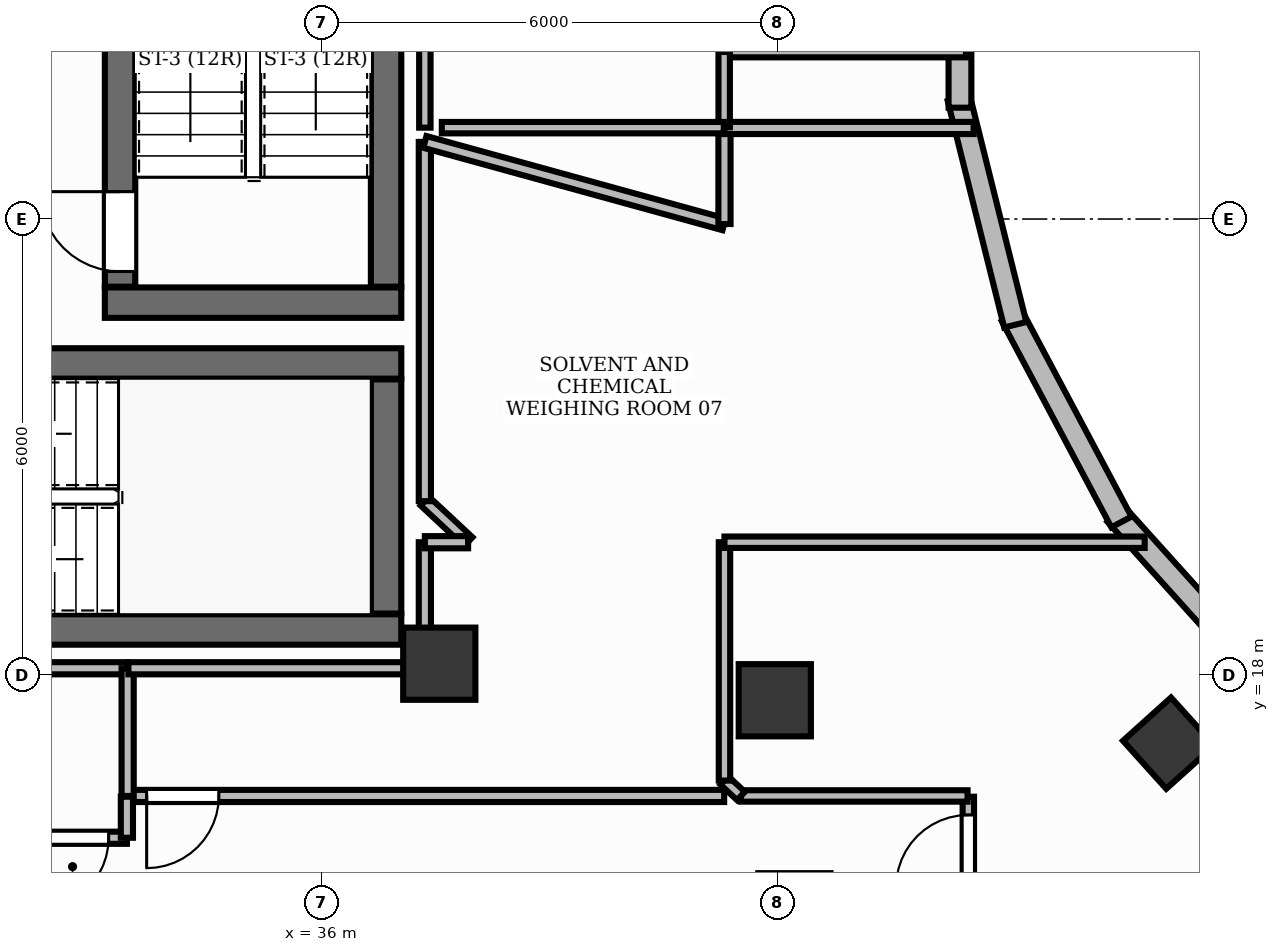
"""IFC4 building model, lengths in metres.
Left out: names, types, materials, properties, quantities, classifications, styles, units other than length and angle.
Written with IfcOpenShell. Run it as: python <this file> out.ifc"""

import sys

from ifc_helpers import new_model, si_unit, direction, frame, frame_2d, origin, origin_2d, place, context, subcontext, project, spatial, rectangle, extrude, element, fill, save


model = new_model("IFC4")
c1 = context("Model", 3, precision=1e-05, world=origin(), true_north=direction((0.0, 1.0)))
c2 = subcontext(c1, "Body", "Model", "MODEL_VIEW")
j1 = project(units=[si_unit("LENGTHUNIT", "METRE"), si_unit("PLANEANGLEUNIT", "RADIAN")], contexts=[c1])
p1 = place(None, origin())
s1 = spatial("IfcSite", under=j1, at=p1, CompositionType="ELEMENT")
p2 = place(p1, origin())
s2 = spatial("IfcBuilding", under=s1, at=p2, CompositionType="ELEMENT")
p3 = place(p2, frame((0.0, 0.0, 264.6)))
s3 = spatial("IfcBuildingStorey", under=s2, at=p3, CompositionType="ELEMENT", Elevation=264.6)
p4 = place(p3, frame((28.852, 18.6, 0.0), z_axis=(0.0, 0.0, 1.0), x_axis=(1.0, 0.0, 0.0)))
e1 = element("IfcWall", 1, at=p4, inside=s3, PredefinedType="SHEAR", context=c2, shape_type="SweptSolid", body=[
    extrude(rectangle(XDim=8.198, YDim=0.4, at=frame_2d((4.099, 0.0))), origin(), (0.0, 0.0, 1.0), 3.9),
])
p5 = place(p3, frame((28.4, 22.1, 0.0), z_axis=(0.0, 0.0, 1.0), x_axis=(1.0, 0.0, 0.0)))
e2 = element("IfcWall", 2, at=p5, inside=s3, PredefinedType="SHEAR", context=c2, shape_type="SweptSolid", body=[
    extrude(rectangle(XDim=8.65, YDim=0.4, at=frame_2d((4.325, 0.0))), origin(), (0.0, 0.0, 1.0), 3.9),
])
p6 = place(p3, frame((36.85, 18.81, 0.0), z_axis=(0.0, 0.0, 1.0), x_axis=(0.0, 1.0, 0.0)))
e3 = element("IfcWall", 3, at=p6, inside=s3, PredefinedType="SHEAR", context=c2, shape_type="SweptSolid", body=[
    extrude(rectangle(XDim=3.08, YDim=0.4, at=frame_2d((1.54, 0.0))), origin(), (0.0, 0.0, 1.0), 3.9),
])
p7 = place(p3, frame((33.15, 22.9, 0.0), z_axis=(0.0, 0.0, 1.0), x_axis=(1.0, 0.0, 0.0)))
e4 = element("IfcWall", 4, at=p7, inside=s3, PredefinedType="SHEAR", context=c2, shape_type="SweptSolid", body=[
    extrude(rectangle(XDim=3.9, YDim=0.4, at=frame_2d((1.95, 0.0))), origin(), (0.0, 0.0, 1.0), 3.9),
])
p8 = place(p3, frame((36.85, 23.11, 0.0), z_axis=(0.0, 0.0, 1.0), x_axis=(0.0, 1.0, 0.0)))
e5 = element("IfcWall", 5, at=p8, inside=s3, PredefinedType="SHEAR", context=c2, shape_type="SweptSolid", body=[
    extrude(rectangle(XDim=7.78, YDim=0.4, at=frame_2d((3.89, 0.0))), origin(), (0.0, 0.0, 1.0), 3.9),
])
p9 = place(p3, frame((33.35, 23.11, 0.0), z_axis=(0.0, 0.0, 1.0), x_axis=(0.0, 1.0, 0.0)))
e6 = element("IfcWall", 6, at=p9, inside=s3, PredefinedType="SHEAR", context=c2, shape_type="SweptSolid", body=[
    extrude(rectangle(XDim=7.78, YDim=0.4, at=frame_2d((3.89, 0.0))), origin(), (0.0, 0.0, 1.0), 3.9),
])
p10 = place(p9, frame((0.2, 0.0, 0.0)))
e7 = element("IfcOpeningElement", 7, at=p10, cuts=e6, PredefinedType="OPENING", context=c2, shape_type="SweptSolid", body=[
    extrude(rectangle(XDim=1.05, YDim=2.15, at=frame_2d((0.525, 1.075))), frame((0.0, 0.215, 0.0), z_axis=(0.0, -1.0, 0.0), x_axis=(1.0, 0.0, 0.0)), (0.0, 0.0, 1.0), 0.43),
])
p11 = place(p3, frame((37.55, 18.15, -0.0), z_axis=(0.0, 0.0, 1.0), x_axis=(1.0, 0.0, 0.0)))
e8 = element("IfcColumn", 8, at=p11, inside=s3, PredefinedType="PILASTER", context=c2, shape_type="SweptSolid", body=[
    extrude(rectangle(XDim=0.95, YDim=0.95, at=origin_2d()), origin(), (0.0, 0.0, 1.0), 3.901),
])
p12 = place(p3, frame((47.146, 17.104, -0.0), z_axis=(0.0, 0.0, 1.0), x_axis=(-0.669130606359, 0.743144825477, 0.0)))
e9 = element("IfcColumn", 9, at=p12, inside=s3, PredefinedType="COLUMN", context=c2, shape_type="SweptSolid", body=[
    extrude(rectangle(XDim=0.85, YDim=0.85, at=origin_2d()), origin(), (0.0, 0.0, 1.0), 3.901),
])
p13 = place(p3, frame((41.964, 17.669, -0.0), z_axis=(0.0, 0.0, 1.0), x_axis=(1.0, 0.0, 0.0)))
e10 = element("IfcColumn", 10, at=p13, inside=s3, PredefinedType="COLUMN", context=c2, shape_type="SweptSolid", body=[
    extrude(rectangle(XDim=0.95, YDim=0.95, at=origin_2d()), origin(), (0.0, 0.0, 1.0), 3.901),
])
p14 = place(p3, frame((48.508, 17.835, 0.0), z_axis=(0.0, 0.0, 1.0), x_axis=(-0.669127242861, 0.743147853971, 0.0)))
e11 = element("IfcWall", 11, at=p14, inside=s3, PredefinedType="STANDARD", context=c2, shape_type="SweptSolid", body=[
    extrude(rectangle(XDim=3.071, YDim=0.3, at=frame_2d((1.535, 0.0))), origin(), (0.0, 0.0, 1.0), 3.9),
])
p15 = place(p3, frame((46.524, 20.014, 0.0), z_axis=(0.0, 0.0, 1.0), x_axis=(-0.469494296004, 0.882935505017, 0.0)))
e12 = element("IfcWall", 12, at=p15, inside=s3, PredefinedType="STANDARD", context=c2, shape_type="SweptSolid", body=[
    extrude(rectangle(XDim=3.071, YDim=0.3, at=frame_2d((1.535, 0.0))), origin(), (0.0, 0.0, 1.0), 3.9),
])
p16 = place(p3, frame((45.127, 22.609, 0.0), z_axis=(0.0, 0.0, 1.0), x_axis=(-0.241880750878, 0.970305983881, 0.0)))
e13 = element("IfcWall", 13, at=p16, inside=s3, PredefinedType="STANDARD", context=c2, shape_type="SweptSolid", body=[
    extrude(rectangle(XDim=3.07, YDim=0.3, at=frame_2d((1.535, 0.0))), origin(), (0.0, 0.0, 1.0), 3.9),
])
p17 = place(p3, frame((44.4, 25.465, 0.0), z_axis=(0.0, 0.0, 1.0), x_axis=(0.0, 1.0, 0.0)))
e14 = element("IfcWall", 14, at=p17, inside=s3, PredefinedType="STANDARD", context=c2, shape_type="SweptSolid", body=[
    extrude(rectangle(XDim=3.071, YDim=0.3, at=frame_2d((1.535, 0.0))), origin(), (0.0, 0.0, 1.0), 3.9),
])
p18 = place(p3, frame((33.44, 15.86, 0.0), z_axis=(0.0, 0.0, 1.0), x_axis=(-1.0, 0.0, 0.0)))
e15 = element("IfcWall", 15, at=p18, inside=s3, PredefinedType="PARTITIONING", context=c2, shape_type="SweptSolid", body=[
    extrude(rectangle(XDim=3.28, YDim=0.16, at=frame_2d((1.64, 0.0))), origin(), (0.0, 0.0, 1.0), 2.91),
])
p19 = place(p18, frame((0.24, 0.0, 0.0)))
e16 = element("IfcOpeningElement", 16, at=p19, cuts=e15, PredefinedType="OPENING", context=c2, shape_type="SweptSolid", body=[
    extrude(rectangle(XDim=0.95, YDim=2.15, at=frame_2d((0.475, 1.075))), frame((0.0, 0.095, 0.0), z_axis=(0.0, -1.0, 0.0), x_axis=(1.0, 0.0, 0.0)), (0.0, 0.0, 1.0), 0.19),
])
p20 = place(p3, frame((44.51, 13.625, 0.0), z_axis=(0.0, 0.0, 1.0), x_axis=(0.0, 1.0, 0.0)))
e17 = element("IfcWall", 17, at=p20, inside=s3, PredefinedType="PARTITIONING", context=c2, shape_type="SweptSolid", body=[
    extrude(rectangle(XDim=2.775, YDim=0.15, at=frame_2d((1.387, 0.0))), origin(), (0.0, 0.0, 1.0), 2.91),
])
p21 = place(p20, frame((1.585, 0.0, 0.0)))
e18 = element("IfcOpeningElement", 18, at=p21, cuts=e17, PredefinedType="OPENING", context=c2, shape_type="SweptSolid", body=[
    extrude(rectangle(XDim=0.95, YDim=2.15, at=frame_2d((0.475, 1.075))), frame((0.0, 0.09, 0.0), z_axis=(0.0, -1.0, 0.0), x_axis=(1.0, 0.0, 0.0)), (0.0, 0.0, 1.0), 0.18),
])
p22 = place(p3, frame((41.298, 16.41, 0.0), z_axis=(0.0, 0.0, 1.0), x_axis=(-1.0, 0.0, 0.0)))
e19 = element("IfcWall", 19, at=p22, inside=s3, PredefinedType="PARTITIONING", context=c2, shape_type="SweptSolid", body=[
    extrude(rectangle(XDim=7.838, YDim=0.16, at=frame_2d((3.919, 0.0))), origin(), (0.0, 0.0, 1.0), 2.91),
])
p23 = place(p22, frame((6.648, 0.0, 0.0)))
e20 = element("IfcOpeningElement", 20, at=p23, cuts=e19, PredefinedType="OPENING", context=c2, shape_type="SweptSolid", body=[
    extrude(rectangle(XDim=0.95, YDim=2.15, at=frame_2d((0.475, 1.075))), frame((0.0, 0.095, 0.0), z_axis=(0.0, -1.0, 0.0), x_axis=(1.0, 0.0, 0.0)), (0.0, 0.0, 1.0), 0.19),
])
p24 = place(p3, frame((33.44, 16.4, 0.0), z_axis=(0.0, 0.0, 1.0), x_axis=(0.0, -1.0, 0.0)))
e21 = element("IfcWall", 21, at=p24, inside=s3, PredefinedType="PARTITIONING", context=c2, shape_type="SweptSolid", body=[
    extrude(rectangle(XDim=0.54, YDim=0.16, at=frame_2d((0.27, 0.0))), origin(), (0.0, 0.0, 1.0), 2.91),
])
p25 = place(p3, frame((30.15, 18.09, 0.0), z_axis=(0.0, 0.0, 1.0), x_axis=(1.0, 0.0, 0.0)))
e22 = element("IfcWall", 22, at=p25, inside=s3, PredefinedType="PARTITIONING", context=c2, shape_type="SweptSolid", body=[
    extrude(rectangle(XDim=3.3, YDim=0.16, at=frame_2d((1.65, 0.0))), origin(), (0.0, 0.0, 1.0), 2.91),
])
p26 = place(p3, frame((33.45, 18.09, 0.0), z_axis=(0.0, 0.0, 1.0), x_axis=(0.0, -1.0, 0.0)))
e23 = element("IfcWall", 23, at=p26, inside=s3, PredefinedType="PARTITIONING", context=c2, shape_type="SweptSolid", body=[
    extrude(rectangle(XDim=1.68, YDim=0.16, at=frame_2d((0.84, 0.0))), origin(), (0.0, 0.0, 1.0), 2.91),
])
p27 = place(p3, frame((44.5, 16.41, 0.0), z_axis=(0.0, 0.0, 1.0), x_axis=(-1.0, 0.0, 0.0)))
e24 = element("IfcWall", 24, at=p27, inside=s3, PredefinedType="PARTITIONING", context=c2, shape_type="SweptSolid", body=[
    extrude(rectangle(XDim=2.981, YDim=0.15, at=frame_2d((1.491, 0.0))), origin(), (0.0, 0.0, 1.0), 2.91),
])
p28 = place(p3, frame((41.519, 16.41, 0.0), z_axis=(0.0, 0.0, 1.0), x_axis=(-0.73097314168, 0.682406232491, 0.0)))
e25 = element("IfcWall", 25, at=p28, inside=s3, PredefinedType="PARTITIONING", context=c2, shape_type="SweptSolid", body=[
    extrude(rectangle(XDim=0.297, YDim=0.15, at=frame_2d((0.148, 0.0))), origin(), (0.0, 0.0, 1.0), 2.91),
])
p29 = place(p3, frame((41.302, 16.612, 0.0), z_axis=(0.0, 0.0, 1.0), x_axis=(0.0, 1.0, 0.0)))
e26 = element("IfcWall", 26, at=p29, inside=s3, PredefinedType="PARTITIONING", context=c2, shape_type="SweptSolid", body=[
    extrude(rectangle(XDim=3.136, YDim=0.15, at=frame_2d((1.568, 0.0))), origin(), (0.0, 0.0, 1.0), 2.91),
])
p30 = place(p3, frame((41.302, 19.748, 0.0), z_axis=(0.0, 0.0, 1.0), x_axis=(1.0, 0.0, 0.0)))
e27 = element("IfcWall", 27, at=p30, inside=s3, PredefinedType="PARTITIONING", context=c2, shape_type="SweptSolid", body=[
    extrude(rectangle(XDim=5.528, YDim=0.15, at=frame_2d((2.764, 0.0))), origin(), (0.0, 0.0, 1.0), 2.91),
])
p31 = place(p3, frame((37.932, 19.755, 0.0), z_axis=(0.0, 0.0, 1.0), x_axis=(-0.731345965406, 0.682006656041, 0.0)))
e28 = element("IfcWall", 28, at=p31, inside=s3, PredefinedType="PARTITIONING", context=c2, shape_type="SweptSolid", body=[
    extrude(rectangle(XDim=0.782, YDim=0.16, at=frame_2d((0.391, 0.0))), origin(), (0.0, 0.0, 1.0), 2.91),
])
p32 = place(p3, frame((37.36, 20.288, 0.0), z_axis=(0.0, 0.0, 1.0), x_axis=(0.0, 1.0, 0.0)))
e29 = element("IfcWall", 29, at=p32, inside=s3, PredefinedType="PARTITIONING", context=c2, shape_type="SweptSolid", body=[
    extrude(rectangle(XDim=4.727, YDim=0.16, at=frame_2d((2.363, 0.0))), origin(), (0.0, 0.0, 1.0), 2.91),
])
p33 = place(p3, frame((37.36, 25.015, 0.0), z_axis=(0.0, 0.0, 1.0), x_axis=(0.964088745179, -0.26558029185, 0.0)))
e30 = element("IfcWall", 30, at=p33, inside=s3, PredefinedType="PARTITIONING", context=c2, shape_type="SweptSolid", body=[
    extrude(rectangle(XDim=4.083, YDim=0.16, at=frame_2d((2.042, 0.0))), origin(), (0.0, 0.0, 1.0), 2.91),
])
p34 = place(p3, frame((41.302, 23.934, 0.0), z_axis=(0.0, 0.0, 1.0), x_axis=(0.0, 1.0, 0.0)))
e31 = element("IfcWall", 31, at=p34, inside=s3, PredefinedType="PARTITIONING", context=c2, shape_type="SweptSolid", body=[
    extrude(rectangle(XDim=1.264, YDim=0.16, at=frame_2d((0.632, 0.0))), origin(), (0.0, 0.0, 1.0), 2.91),
])
p35 = place(p3, frame((41.302, 25.198, 0.0), z_axis=(0.0, 0.0, 1.0), x_axis=(1.0, 0.0, 0.0)))
e32 = element("IfcWall", 32, at=p35, inside=s3, PredefinedType="PARTITIONING", context=c2, shape_type="SweptSolid", body=[
    extrude(rectangle(XDim=3.277, YDim=0.16, at=frame_2d((1.638, 0.0))), origin(), (0.0, 0.0, 1.0), 2.91),
])
p36 = place(p3, frame((33.46, 18.09, 0.0), z_axis=(0.0, 0.0, 1.0), x_axis=(1.0, 0.0, 0.0)))
e33 = element("IfcWall", 33, at=p36, inside=s3, PredefinedType="PARTITIONING", context=c2, shape_type="SweptSolid", body=[
    extrude(rectangle(XDim=3.89, YDim=0.16, at=frame_2d((1.945, 0.0))), origin(), (0.0, 0.0, 1.0), 2.91),
])
p37 = place(p3, frame((37.36, 18.1, 0.0), z_axis=(0.0, 0.0, 1.0), x_axis=(0.0, 1.0, 0.0)))
e34 = element("IfcWall", 34, at=p37, inside=s3, PredefinedType="PARTITIONING", context=c2, shape_type="SweptSolid", body=[
    extrude(rectangle(XDim=1.648, YDim=0.16, at=frame_2d((0.824, 0.0))), origin(), (0.0, 0.0, 1.0), 2.91),
])
p38 = place(p3, frame((37.36, 19.748, 0.0), z_axis=(0.0, 0.0, 1.0), x_axis=(1.0, 0.0, 0.0)))
e35 = element("IfcWall", 35, at=p38, inside=s3, PredefinedType="PARTITIONING", context=c2, shape_type="SweptSolid", body=[
    extrude(rectangle(XDim=0.569, YDim=0.16, at=frame_2d((0.285, 0.0))), origin(), (0.0, 0.0, 1.0), 2.91),
])
p39 = place(p3, frame((44.479, 26.202, 0.0), z_axis=(0.0, 0.0, 1.0), x_axis=(-1.0, 0.0, 0.0)))
e36 = element("IfcWall", 36, at=p39, inside=s3, PredefinedType="PARTITIONING", context=c2, shape_type="SweptSolid", body=[
    extrude(rectangle(XDim=3.177, YDim=0.15, at=frame_2d((1.588, 0.0))), origin(), (0.0, 0.0, 1.0), 2.91),
])
p40 = place(p3, frame((41.298, 26.198, 0.0), z_axis=(0.0, 0.0, 1.0), x_axis=(0.0, -1.0, 0.0)))
e37 = element("IfcWall", 37, at=p40, inside=s3, PredefinedType="PARTITIONING", context=c2, shape_type="SweptSolid", body=[
    extrude(rectangle(XDim=0.991, YDim=0.15, at=frame_2d((0.495, 0.0))), origin(), (0.0, 0.0, 1.0), 2.91),
])
p41 = place(p3, frame((41.293, 25.202, 0.0), z_axis=(0.0, 0.0, 1.0), x_axis=(-1.0, 0.0, 0.0)))
e38 = element("IfcWall", 38, at=p41, inside=s3, PredefinedType="PARTITIONING", context=c2, shape_type="SweptSolid", body=[
    extrude(rectangle(XDim=3.709, YDim=0.15, at=frame_2d((1.855, 0.0))), origin(), (0.0, 0.0, 1.0), 2.91),
])
p42 = place(p3, frame((37.36, 25.202, 0.0), z_axis=(0.0, 0.0, 1.0), x_axis=(0.0, 1.0, 0.0)))
e39 = element("IfcWall", 39, at=p42, inside=s3, PredefinedType="PARTITIONING", context=c2, shape_type="SweptSolid", body=[
    extrude(rectangle(XDim=4.205, YDim=0.15, at=frame_2d((2.103, 0.0))), origin(), (0.0, 0.0, 1.0), 2.91),
])
p43 = place(p10, origin())
e40 = element("IfcDoor", 40, at=p43, inside=s3, OperationType="SINGLE_SWING_RIGHT", PredefinedType="DOOR", context=c2, shape_type="SweptSolid", body=[
    extrude(rectangle(XDim=1.05, YDim=2.15, at=frame_2d((0.525, 1.075))), frame((0.0, 0.025, 0.0), z_axis=(0.0, -1.0, 0.0), x_axis=(1.0, 0.0, 0.0)), (0.0, 0.0, 1.0), 0.05),
])
fill(e7, e40)
p44 = place(p19, origin())
e41 = element("IfcDoor", 41, at=p44, inside=s3, OperationType="SINGLE_SWING_RIGHT", PredefinedType="DOOR", context=c2, shape_type="SweptSolid", body=[
    extrude(rectangle(XDim=0.95, YDim=2.15, at=frame_2d((0.475, 1.075))), frame((0.0, 0.025, 0.0), z_axis=(0.0, -1.0, 0.0), x_axis=(1.0, 0.0, 0.0)), (0.0, 0.0, 1.0), 0.05),
])
fill(e16, e41)
p45 = place(p21, origin())
e42 = element("IfcDoor", 42, at=p45, inside=s3, OperationType="SINGLE_SWING_LEFT", PredefinedType="DOOR", context=c2, shape_type="SweptSolid", body=[
    extrude(rectangle(XDim=0.95, YDim=2.15, at=frame_2d((0.475, 1.075))), frame((0.0, 0.025, 0.0), z_axis=(0.0, -1.0, 0.0), x_axis=(1.0, 0.0, 0.0)), (0.0, 0.0, 1.0), 0.05),
])
fill(e18, e42)
p46 = place(p23, origin())
e43 = element("IfcDoor", 43, at=p46, inside=s3, OperationType="SINGLE_SWING_RIGHT", PredefinedType="DOOR", context=c2, shape_type="SweptSolid", body=[
    extrude(rectangle(XDim=0.95, YDim=2.15, at=frame_2d((0.475, 1.075))), frame((0.0, 0.025, 0.0), z_axis=(0.0, -1.0, 0.0), x_axis=(1.0, 0.0, 0.0)), (0.0, 0.0, 1.0), 0.05),
])
fill(e20, e43)
save(model, sys.argv[1])
